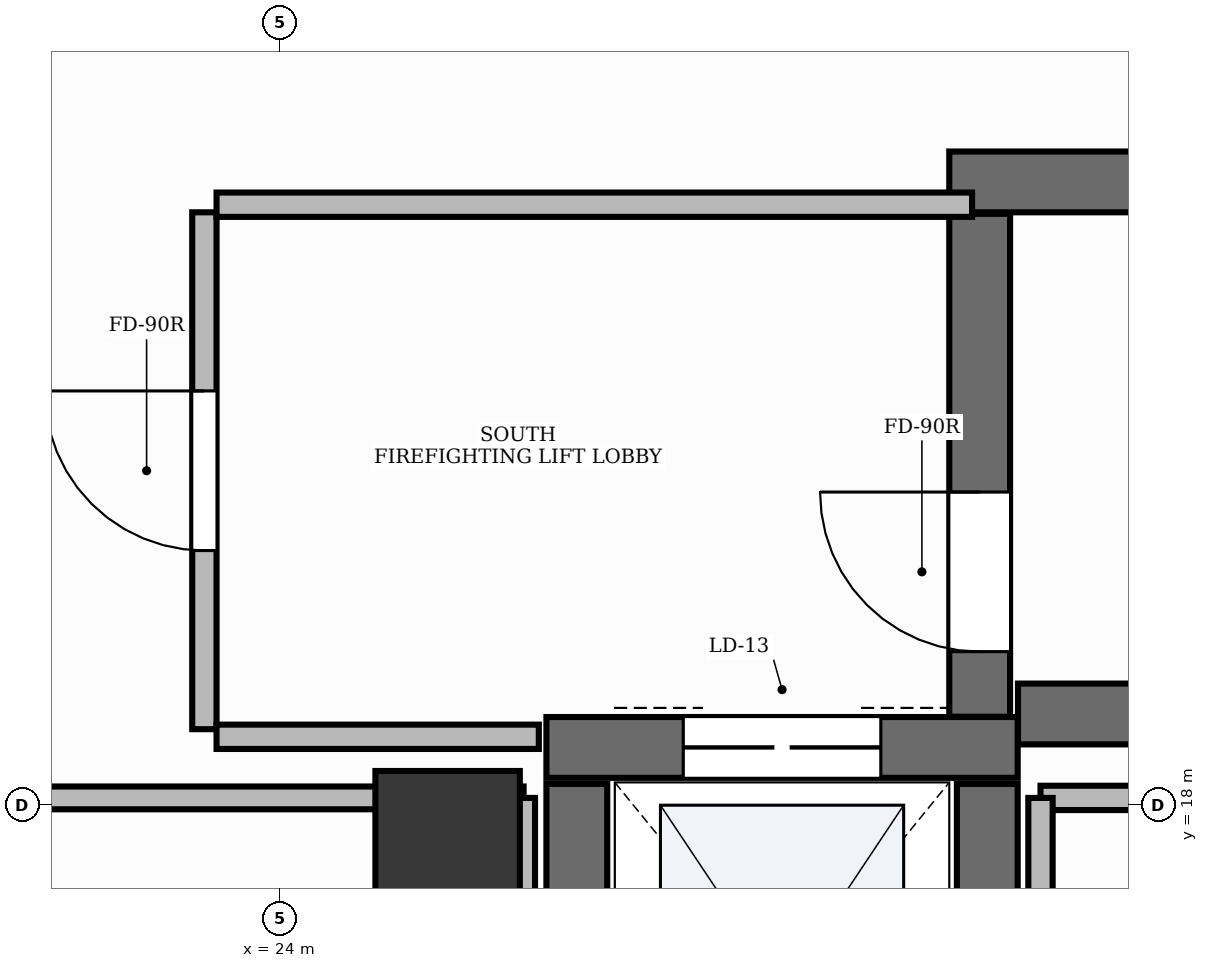
"""IFC4 building model, lengths in metres.
Left out: names, types, materials, properties, quantities, classifications, styles, units other than length and angle.
Written with IfcOpenShell. Run it as: python <this file> out.ifc"""

import sys

from ifc_helpers import new_model, si_unit, direction, frame, frame_2d, origin, origin_2d, place, context, subcontext, project, spatial, rectangle, extrude, element, fill, save


model = new_model("IFC4")
c1 = context("Model", 3, precision=1e-05, world=origin(), true_north=direction((0.0, 1.0)))
c2 = subcontext(c1, "Body", "Model", "MODEL_VIEW")
j1 = project(units=[si_unit("LENGTHUNIT", "METRE"), si_unit("PLANEANGLEUNIT", "RADIAN")], contexts=[c1])
p1 = place(None, origin())
s1 = spatial("IfcSite", under=j1, at=p1, CompositionType="ELEMENT")
p2 = place(p1, origin())
s2 = spatial("IfcBuilding", under=s1, at=p2, CompositionType="ELEMENT")
p3 = place(p2, frame((0.0, 0.0, 154.2)))
s3 = spatial("IfcBuildingStorey", under=s2, at=p3, CompositionType="ELEMENT", Elevation=154.2)
p4 = place(p3, frame((28.852, 18.6, 0.0), z_axis=(0.0, 0.0, 1.0), x_axis=(1.0, 0.0, 0.0)))
e1 = element("IfcWall", 1, at=p4, inside=s3, PredefinedType="SHEAR", context=c2, shape_type="SweptSolid", body=[
    extrude(rectangle(XDim=8.198, YDim=0.4, at=frame_2d((4.099, 0.0))), origin(), (0.0, 0.0, 1.0), 3.9),
])
p5 = place(p3, frame((28.4, 22.1, 0.0), z_axis=(0.0, 0.0, 1.0), x_axis=(1.0, 0.0, 0.0)))
e2 = element("IfcWall", 2, at=p5, inside=s3, PredefinedType="SHEAR", context=c2, shape_type="SweptSolid", body=[
    extrude(rectangle(XDim=8.65, YDim=0.4, at=frame_2d((4.325, 0.0))), origin(), (0.0, 0.0, 1.0), 3.9),
])
p6 = place(p3, frame((28.6, 18.582, 0.0), z_axis=(0.0, 0.0, 1.0), x_axis=(0.0, 1.0, 0.0)))
e3 = element("IfcWall", 3, at=p6, inside=s3, PredefinedType="SHEAR", context=c2, shape_type="SweptSolid", body=[
    extrude(rectangle(XDim=3.308, YDim=0.4, at=frame_2d((1.654, 0.0))), origin(), (0.0, 0.0, 1.0), 3.9),
])
p7 = place(p6, frame((0.428, 0.0, 0.0)))
e4 = element("IfcOpeningElement", 4, at=p7, cuts=e3, PredefinedType="OPENING", context=c2, shape_type="SweptSolid", body=[
    extrude(rectangle(XDim=1.05, YDim=2.15, at=frame_2d((0.525, 1.075))), frame((0.0, 0.215, 0.0), z_axis=(0.0, -1.0, 0.0), x_axis=(1.0, 0.0, 0.0)), (0.0, 0.0, 1.0), 0.43),
])
p8 = place(p3, frame((25.75, 18.38, 0.0), z_axis=(0.0, 0.0, 1.0), x_axis=(1.0, 0.0, 0.0)))
e5 = element("IfcWall", 5, at=p8, inside=s3, PredefinedType="SHEAR", context=c2, shape_type="SweptSolid", body=[
    extrude(rectangle(XDim=3.1, YDim=0.4, at=frame_2d((1.55, 0.0))), origin(), (0.0, 0.0, 1.0), 3.9),
])
p9 = place(p8, frame((0.9, 0.0, 0.0)))
e6 = element("IfcOpeningElement", 6, at=p9, cuts=e5, PredefinedType="OPENING", context=c2, shape_type="SweptSolid", body=[
    extrude(rectangle(XDim=1.3, YDim=2.2, at=frame_2d((0.65, 1.1))), frame((0.0, 0.215, 0.0), z_axis=(0.0, -1.0, 0.0), x_axis=(1.0, 0.0, 0.0)), (0.0, 0.0, 1.0), 0.43),
])
for number, where, z_axis, x_axis in (
    (7, (25.95, 15.44, 0.0), (0.0, 0.0, 1.0), (0.0, 1.0, 0.0)),
    (8, (28.65, 15.44, 0.0), (0.0, 0.0, 1.0), (0.0, 1.0, 0.0)),
):
    element("IfcWall", number, at=place(p3, frame(where, z_axis=z_axis, x_axis=x_axis)), inside=s3, PredefinedType="SHEAR", context=c2, shape_type="SweptSolid", body=[
        extrude(rectangle(XDim=2.7, YDim=0.4, at=frame_2d((1.35, 0.0))), origin(), (0.0, 0.0, 1.0), 3.9),
    ])
p10 = place(p3, frame((25.1, 17.75, -0.0), z_axis=(0.0, 0.0, 1.0), x_axis=(1.0, 0.0, 0.0)))
e9 = element("IfcColumn", 9, at=p10, inside=s3, PredefinedType="PILASTER", context=c2, shape_type="SweptSolid", body=[
    extrude(rectangle(XDim=0.95, YDim=0.95, at=origin_2d()), origin(), (0.0, 0.0, 1.0), 3.901),
])
p11 = place(p3, frame((23.5, 18.5, 0.0), z_axis=(0.0, 0.0, 1.0), x_axis=(0.0, 1.0, 0.0)))
e10 = element("IfcWall", 10, at=p11, inside=s3, PredefinedType="PARTITIONING", context=c2, shape_type="SweptSolid", body=[
    extrude(rectangle(XDim=3.4, YDim=0.16, at=frame_2d((1.7, 0.0))), origin(), (0.0, 0.0, 1.0), 2.91),
])
p12 = place(p11, frame((1.175, 0.0, 0.0)))
e11 = element("IfcOpeningElement", 11, at=p12, cuts=e10, PredefinedType="OPENING", context=c2, shape_type="SweptSolid", body=[
    extrude(rectangle(XDim=1.05, YDim=2.15, at=frame_2d((0.525, 1.075))), frame((0.0, 0.095, 0.0), z_axis=(0.0, -1.0, 0.0), x_axis=(1.0, 0.0, 0.0)), (0.0, 0.0, 1.0), 0.19),
])
p13 = place(p3, frame((23.58, 21.95, 0.0), z_axis=(0.0, 0.0, 1.0), x_axis=(1.0, 0.0, 0.0)))
e12 = element("IfcWall", 12, at=p13, inside=s3, PredefinedType="PARTITIONING", context=c2, shape_type="SweptSolid", body=[
    extrude(rectangle(XDim=4.97, YDim=0.16, at=frame_2d((2.485, 0.0))), origin(), (0.0, 0.0, 1.0), 2.91),
])
p14 = place(p3, frame((23.58, 18.45, 0.0), z_axis=(0.0, 0.0, 1.0), x_axis=(1.0, 0.0, 0.0)))
e13 = element("IfcWall", 13, at=p14, inside=s3, PredefinedType="PARTITIONING", context=c2, shape_type="SweptSolid", body=[
    extrude(rectangle(XDim=2.12, YDim=0.16, at=frame_2d((1.06, 0.0))), origin(), (0.0, 0.0, 1.0), 2.91),
])
p15 = place(p3, frame((21.779, 18.048, 0.0), z_axis=(0.0, 0.0, 1.0), x_axis=(1.0, 0.0, 0.0)))
e14 = element("IfcWall", 14, at=p15, inside=s3, PredefinedType="PARTITIONING", context=c2, shape_type="SweptSolid", body=[
    extrude(rectangle(XDim=3.821, YDim=0.15, at=frame_2d((1.91, 0.0))), origin(), (0.0, 0.0, 1.0), 2.91),
])
p16 = place(p3, frame((25.6, 18.048, 0.0), z_axis=(0.0, 0.0, 1.0), x_axis=(0.0, -1.0, 0.0)))
e15 = element("IfcWall", 15, at=p16, inside=s3, PredefinedType="PARTITIONING", context=c2, shape_type="SweptSolid", body=[
    extrude(rectangle(XDim=1.638, YDim=0.15, at=frame_2d((0.819, 0.0))), origin(), (0.0, 0.0, 1.0), 2.91),
])
p17 = place(p3, frame((29.0, 18.048, 0.0), z_axis=(0.0, 0.0, 1.0), x_axis=(1.0, 0.0, 0.0)))
e16 = element("IfcWall", 16, at=p17, inside=s3, PredefinedType="PARTITIONING", context=c2, shape_type="SweptSolid", body=[
    extrude(rectangle(XDim=2.713, YDim=0.16, at=frame_2d((1.356, 0.0))), origin(), (0.0, 0.0, 1.0), 2.91),
])
p18 = place(p3, frame((29.0, 16.41, 0.0), z_axis=(0.0, 0.0, 1.0), x_axis=(0.0, 1.0, 0.0)))
e17 = element("IfcWall", 17, at=p18, inside=s3, PredefinedType="PARTITIONING", context=c2, shape_type="SweptSolid", body=[
    extrude(rectangle(XDim=1.638, YDim=0.16, at=frame_2d((0.819, 0.0))), origin(), (0.0, 0.0, 1.0), 2.91),
])
p19 = place(p7, origin())
e18 = element("IfcDoor", 18, at=p19, inside=s3, OperationType="SINGLE_SWING_RIGHT", PredefinedType="DOOR", context=c2, shape_type="SweptSolid", body=[
    extrude(rectangle(XDim=1.05, YDim=2.15, at=frame_2d((0.525, 1.075))), frame((0.0, 0.025, 0.0), z_axis=(0.0, -1.0, 0.0), x_axis=(1.0, 0.0, 0.0)), (0.0, 0.0, 1.0), 0.05),
])
fill(e4, e18)
p20 = place(p9, origin())
e19 = element("IfcDoor", 19, at=p20, inside=s3, OperationType="DOUBLE_DOOR_SLIDING", PredefinedType="DOOR", context=c2, shape_type="SweptSolid", body=[
    extrude(rectangle(XDim=1.3, YDim=2.2, at=frame_2d((0.65, 1.1))), frame((0.0, 0.025, 0.0), z_axis=(0.0, -1.0, 0.0), x_axis=(1.0, 0.0, 0.0)), (0.0, 0.0, 1.0), 0.05),
])
fill(e6, e19)
p21 = place(p12, origin())
e20 = element("IfcDoor", 20, at=p21, inside=s3, OperationType="SINGLE_SWING_RIGHT", PredefinedType="DOOR", context=c2, shape_type="SweptSolid", body=[
    extrude(rectangle(XDim=1.05, YDim=2.15, at=frame_2d((0.525, 1.075))), frame((0.0, 0.025, 0.0), z_axis=(0.0, -1.0, 0.0), x_axis=(1.0, 0.0, 0.0)), (0.0, 0.0, 1.0), 0.05),
])
fill(e11, e20)
save(model, sys.argv[1])
